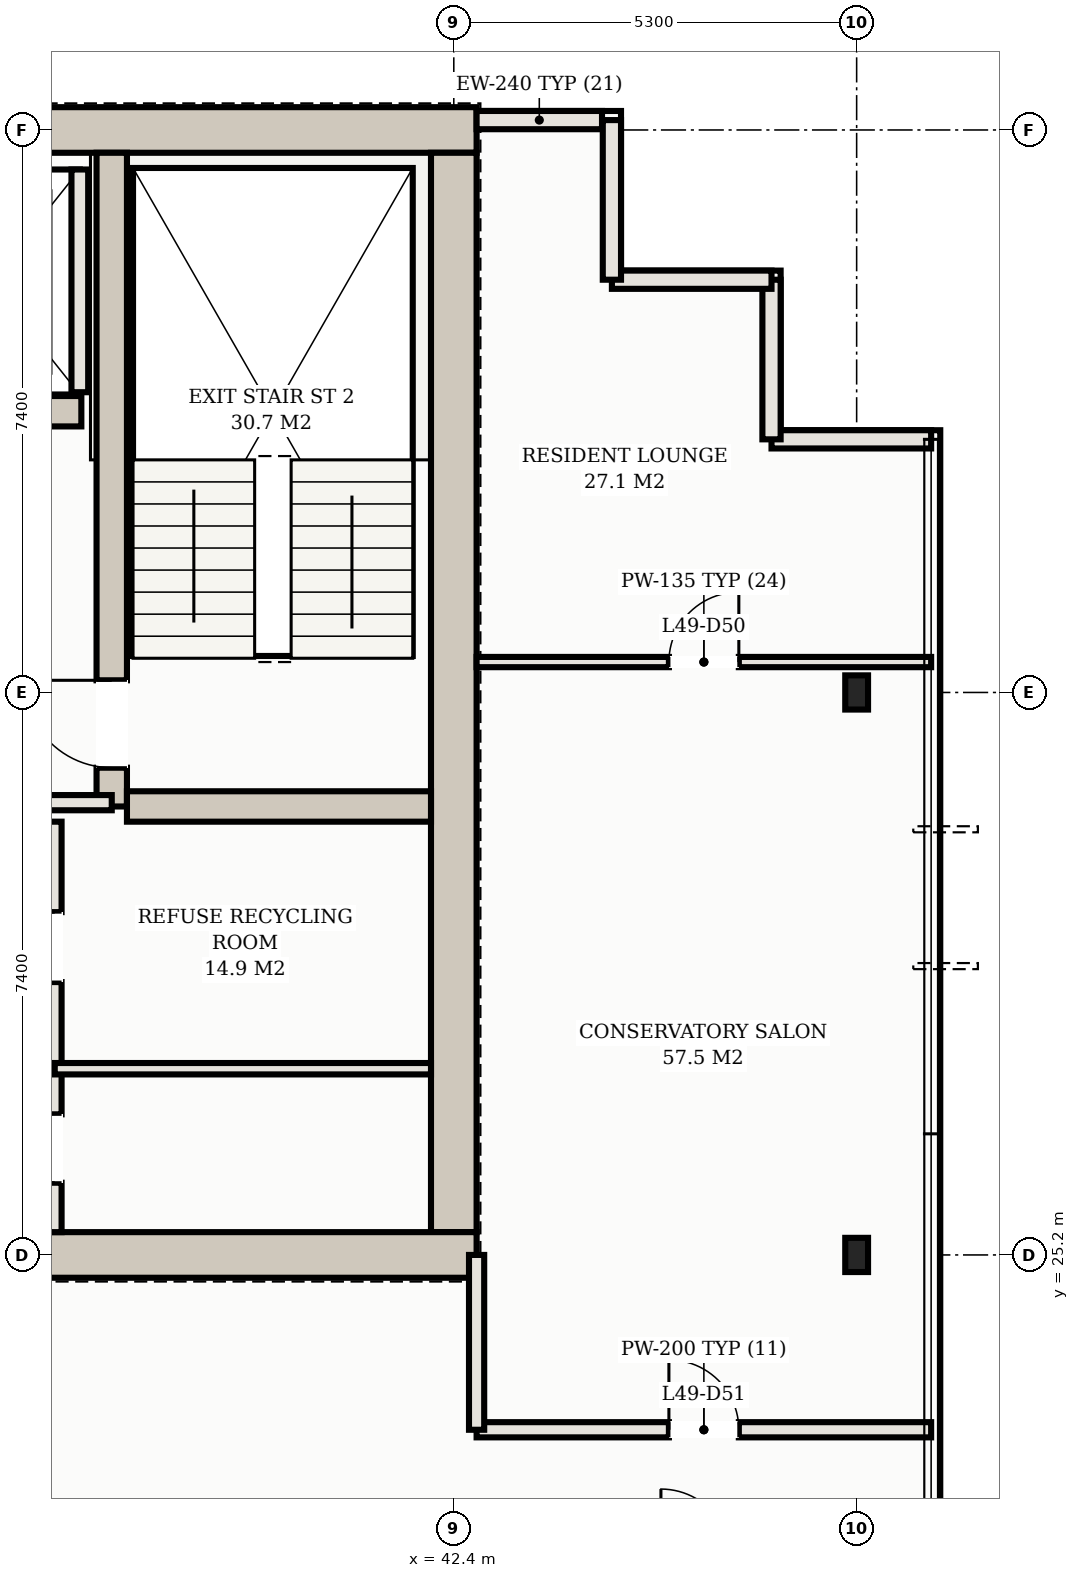
"""IFC4 building model, lengths in metres.
Left out: names, types, materials, properties, quantities, classifications, styles, units other than length and angle.
Written with IfcOpenShell. Run it as: python <this file> out.ifc"""

import sys

from ifc_helpers import new_model, si_unit, direction, frame, frame_2d, origin, origin_2d, place, context, subcontext, project, spatial, rectangle, hollow_rectangle, extrude, element, fill, save


model = new_model("IFC4")
c1 = context("Model", 3, precision=1e-05, world=origin(), true_north=direction((0.0, 1.0)))
c2 = subcontext(c1, "Body", "Model", "MODEL_VIEW")
j1 = project(units=[si_unit("LENGTHUNIT", "METRE"), si_unit("PLANEANGLEUNIT", "RADIAN")], contexts=[c1])
p1 = place(None, origin())
s1 = spatial("IfcSite", under=j1, at=p1, CompositionType="ELEMENT")
p2 = place(p1, origin())
s2 = spatial("IfcBuilding", under=s1, at=p2, CompositionType="ELEMENT")
p3 = place(p2, frame((0.0, 0.0, 178.8)))
s3 = spatial("IfcBuildingStorey", under=s2, at=p3, CompositionType="ELEMENT", Elevation=178.8)
p4 = place(p3, frame((10.3, 40.0, 0.0), z_axis=(0.0, 0.0, 1.0), x_axis=(1.0, 0.0, 0.0)))
e1 = element("IfcWall", 1, at=p4, inside=s3, PredefinedType="SHEAR", context=c2, shape_type="SweptSolid", body=[
    extrude(rectangle(XDim=32.4, YDim=0.6, at=frame_2d((16.2, 0.0))), origin(), (0.0, 0.0, 1.0), 3.1),
])
p5 = place(p3, frame((42.4, 25.5, 0.0), z_axis=(0.0, 0.0, 1.0), x_axis=(0.0, 1.0, 0.0)))
e2 = element("IfcWall", 2, at=p5, inside=s3, PredefinedType="SHEAR", context=c2, shape_type="SweptSolid", body=[
    extrude(rectangle(XDim=14.2, YDim=0.6, at=frame_2d((7.1, 0.0))), origin(), (0.0, 0.0, 1.0), 3.1),
])
p6 = place(p3, frame((34.6, 25.2, 0.0), z_axis=(0.0, 0.0, 1.0), x_axis=(1.0, 0.0, 0.0)))
e3 = element("IfcWall", 3, at=p6, inside=s3, PredefinedType="SHEAR", context=c2, shape_type="SweptSolid", body=[
    extrude(rectangle(XDim=8.1, YDim=0.6, at=frame_2d((4.05, 0.0))), origin(), (0.0, 0.0, 1.0), 3.1),
])
p7 = place(p6, frame((0.65, 0.0, 0.0)))
e4 = element("IfcOpeningElement", 4, at=p7, cuts=e3, PredefinedType="OPENING", context=c2, shape_type="SweptSolid", body=[
    extrude(rectangle(XDim=1.25, YDim=2.2, at=frame_2d((0.625, 1.1))), frame((0.0, 0.31, 0.0), z_axis=(0.0, -1.0, 0.0), x_axis=(1.0, 0.0, 0.0)), (0.0, 0.0, 1.0), 0.62),
])
p8 = place(p3, frame((37.9, 31.1, 0.0), z_axis=(0.0, 0.0, 1.0), x_axis=(0.0, 1.0, 0.0)))
e5 = element("IfcWall", 5, at=p8, inside=s3, PredefinedType="SHEAR", context=c2, shape_type="SweptSolid", body=[
    extrude(rectangle(XDim=8.6, YDim=0.4, at=frame_2d((4.3, 0.0))), origin(), (0.0, 0.0, 1.0), 3.1),
])
p9 = place(p8, frame((0.51, 0.0, 0.0)))
e6 = element("IfcOpeningElement", 6, at=p9, cuts=e5, PredefinedType="OPENING", context=c2, shape_type="SweptSolid", body=[
    extrude(rectangle(XDim=1.15, YDim=2.2, at=frame_2d((0.575, 1.1))), frame((0.0, 0.21, 0.0), z_axis=(0.0, -1.0, 0.0), x_axis=(1.0, 0.0, 0.0)), (0.0, 0.0, 1.0), 0.42),
])
p10 = place(p3, frame((38.1, 31.1, 0.0), z_axis=(0.0, 0.0, 1.0), x_axis=(1.0, 0.0, 0.0)))
e7 = element("IfcWall", 7, at=p10, inside=s3, PredefinedType="SHEAR", context=c2, shape_type="SweptSolid", body=[
    extrude(rectangle(XDim=4.0, YDim=0.4, at=frame_2d((2.0, 0.0))), origin(), (0.0, 0.0, 1.0), 3.1),
])
p11 = place(p3, frame((15.5, 36.3, 0.0), z_axis=(0.0, 0.0, 1.0), x_axis=(1.0, 0.0, 0.0)))
e8 = element("IfcWall", 8, at=p11, inside=s3, PredefinedType="SHEAR", context=c2, shape_type="SweptSolid", body=[
    extrude(rectangle(XDim=22.0, YDim=0.4, at=frame_2d((11.0, 0.0))), origin(), (0.0, 0.0, 1.0), 3.1),
])
p12 = place(p11, frame((0.65, 0.0, 0.0)))
e9 = element("IfcOpeningElement", 9, at=p12, cuts=e8, PredefinedType="OPENING", context=c2, shape_type="SweptSolid", body=[
    extrude(rectangle(XDim=1.1, YDim=2.15, at=frame_2d((0.55, 1.075))), frame((0.0, 0.21, 0.0), z_axis=(0.0, -1.0, 0.0), x_axis=(1.0, 0.0, 0.0)), (0.0, 0.0, 1.0), 0.42),
])
p13 = place(p11, frame((20.25, 0.0, 0.0)))
e10 = element("IfcOpeningElement", 10, at=p13, cuts=e8, PredefinedType="OPENING", context=c2, shape_type="SweptSolid", body=[
    extrude(rectangle(XDim=1.1, YDim=2.15, at=frame_2d((0.55, 1.075))), frame((0.0, 0.21, 0.0), z_axis=(0.0, -1.0, 0.0), x_axis=(1.0, 0.0, 0.0)), (0.0, 0.0, 1.0), 0.42),
])
p14 = place(p11, frame((17.05, 0.0, 0.0)))
e11 = element("IfcOpeningElement", 11, at=p14, cuts=e8, PredefinedType="OPENING", context=c2, shape_type="SweptSolid", body=[
    extrude(rectangle(XDim=1.3, YDim=2.2, at=frame_2d((0.65, 1.1))), frame((0.0, 0.21, 0.0), z_axis=(0.0, -1.0, 0.0), x_axis=(1.0, 0.0, 0.0)), (0.0, 0.0, 1.0), 0.42),
])
for number, where, z_axis, x_axis in (
    (12, (47.7, 25.2, 0.0), (0.0, 0.0, 1.0), (1.0, 0.0, 0.0)),
    (13, (47.7, 32.6, 0.0), (0.0, 0.0, 1.0), (1.0, 0.0, 0.0)),
):
    element("IfcColumn", number, at=place(p3, frame(where, z_axis=z_axis, x_axis=x_axis)), inside=s3, PredefinedType="COLUMN", context=c2, shape_type="SweptSolid", body=[
        extrude(hollow_rectangle(XDim=0.3, YDim=0.45, WallThickness=0.016, at=origin_2d()), origin(), (0.0, 0.0, 1.0), 3.3),
    ])
p15 = place(p3, frame((37.48, 36.55, 0.0), z_axis=(0.0, 0.0, 1.0), x_axis=(0.0, 1.0, 0.0)))
e14 = element("IfcWall", 14, at=p15, inside=s3, PredefinedType="SOLIDWALL", context=c2, shape_type="SweptSolid", body=[
    extrude(rectangle(XDim=2.93, YDim=0.22, at=frame_2d((1.465, 0.0))), origin(), (0.0, 0.0, 1.0), 3.1),
])
p16 = place(p3, frame((48.68, 35.93, 0.0), z_axis=(0.0, 0.0, 1.0), x_axis=(-1.0, 0.0, 0.0)))
e15 = element("IfcWall", 15, at=p16, inside=s3, PredefinedType="SOLIDWALL", context=c2, shape_type="SweptSolid", body=[
    extrude(rectangle(XDim=2.1, YDim=0.24, at=frame_2d((1.05, 0.0))), origin(), (0.0, 0.0, 1.0), 3.1),
])
for number, where, z_axis, x_axis in (
    (16, (46.58, 35.93, 0.0), (0.0, 0.0, 1.0), (0.0, 1.0, 0.0)),
    (17, (46.58, 38.03, 0.0), (0.0, 0.0, 1.0), (-1.0, 0.0, 0.0)),
):
    element("IfcWall", number, at=place(p3, frame(where, z_axis=z_axis, x_axis=x_axis)), inside=s3, PredefinedType="SOLIDWALL", context=c2, shape_type="SweptSolid", body=[
        extrude(rectangle(XDim=2.1, YDim=0.24, at=frame_2d((1.05, 0.0))), origin(), (0.0, 0.0, 1.0), 3.1),
    ])
p17 = place(p3, frame((44.48, 38.03, 0.0), z_axis=(0.0, 0.0, 1.0), x_axis=(0.0, 1.0, 0.0)))
e18 = element("IfcWall", 18, at=p17, inside=s3, PredefinedType="SOLIDWALL", context=c2, shape_type="SweptSolid", body=[
    extrude(rectangle(XDim=2.1, YDim=0.24, at=frame_2d((1.05, 0.0))), origin(), (0.0, 0.0, 1.0), 3.1),
])
p18 = place(p3, frame((44.35, 40.13, 0.0), z_axis=(0.0, 0.0, 1.0), x_axis=(-1.0, 0.0, 0.0)))
e19 = element("IfcWall", 19, at=p18, inside=s3, PredefinedType="SOLIDWALL", context=c2, shape_type="SweptSolid", body=[
    extrude(rectangle(XDim=1.65, YDim=0.24, at=frame_2d((0.825, 0.0))), origin(), (0.0, 0.0, 1.0), 3.1),
])
p19 = place(p3, frame((34.65, 31.15, 0.0), z_axis=(0.0, 0.0, 1.0), x_axis=(1.0, 0.0, 0.0)))
e20 = element("IfcWall", 20, at=p19, inside=s3, PredefinedType="PARTITIONING", context=c2, shape_type="SweptSolid", body=[
    extrude(rectangle(XDim=3.25, YDim=0.2, at=frame_2d((1.625, 0.0))), origin(), (0.0, 0.0, 1.0), 2.38),
])
p20 = place(p19, frame((0.725, 0.0, 0.0)))
e21 = element("IfcOpeningElement", 21, at=p20, cuts=e20, PredefinedType="OPENING", context=c2, shape_type="SweptSolid", body=[
    extrude(rectangle(XDim=1.25, YDim=2.2, at=frame_2d((0.625, 1.1))), frame((0.0, 0.11, 0.0), z_axis=(0.0, -1.0, 0.0), x_axis=(1.0, 0.0, 0.0)), (0.0, 0.0, 1.0), 0.22),
])
p21 = place(p3, frame((37.15, 25.5, 0.0), z_axis=(0.0, 0.0, 1.0), x_axis=(0.0, 1.0, 0.0)))
e22 = element("IfcWall", 22, at=p21, inside=s3, PredefinedType="PARTITIONING", context=c2, shape_type="SweptSolid", body=[
    extrude(rectangle(XDim=5.4, YDim=0.18, at=frame_2d((2.7, 0.0))), origin(), (0.0, 0.0, 1.0), 2.38),
])
p22 = place(p21, frame((0.65, 0.0, 0.0)))
e23 = element("IfcOpeningElement", 23, at=p22, cuts=e22, PredefinedType="OPENING", context=c2, shape_type="SweptSolid", body=[
    extrude(rectangle(XDim=0.9, YDim=2.15, at=frame_2d((0.45, 1.075))), frame((0.0, 0.1, 0.0), z_axis=(0.0, -1.0, 0.0), x_axis=(1.0, 0.0, 0.0)), (0.0, 0.0, 1.0), 0.2),
])
p23 = place(p21, frame((3.29, 0.0, 0.0)))
e24 = element("IfcOpeningElement", 24, at=p23, cuts=e22, PredefinedType="OPENING", context=c2, shape_type="SweptSolid", body=[
    extrude(rectangle(XDim=0.92, YDim=2.15, at=frame_2d((0.46, 1.075))), frame((0.0, 0.1, 0.0), z_axis=(0.0, -1.0, 0.0), x_axis=(1.0, 0.0, 0.0)), (0.0, 0.0, 1.0), 0.2),
])
p24 = place(p3, frame((37.15, 27.65, 0.0), z_axis=(0.0, 0.0, 1.0), x_axis=(1.0, 0.0, 0.0)))
e25 = element("IfcWall", 25, at=p24, inside=s3, PredefinedType="PARTITIONING", context=c2, shape_type="SweptSolid", body=[
    extrude(rectangle(XDim=4.95, YDim=0.15, at=frame_2d((2.475, 0.0))), origin(), (0.0, 0.0, 1.0), 2.38),
])
p25 = place(p3, frame((42.7, 22.9, 0.0), z_axis=(0.0, 0.0, 1.0), x_axis=(1.0, 0.0, 0.0)))
e26 = element("IfcWall", 26, at=p25, inside=s3, PredefinedType="PARTITIONING", context=c2, shape_type="SweptSolid", body=[
    extrude(rectangle(XDim=5.98, YDim=0.2, at=frame_2d((2.99, 0.0))), origin(), (0.0, 0.0, 1.0), 2.38),
])
p26 = place(p25, frame((2.53, 0.0, 0.0)))
e27 = element("IfcOpeningElement", 27, at=p26, cuts=e26, PredefinedType="OPENING", context=c2, shape_type="SweptSolid", body=[
    extrude(rectangle(XDim=0.92, YDim=2.15, at=frame_2d((0.46, 1.075))), frame((0.0, 0.11, 0.0), z_axis=(0.0, -1.0, 0.0), x_axis=(1.0, 0.0, 0.0)), (0.0, 0.0, 1.0), 0.22),
])
p27 = place(p3, frame((42.7, 22.9, 0.0), z_axis=(0.0, 0.0, 1.0), x_axis=(0.0, 1.0, 0.0)))
e28 = element("IfcWall", 28, at=p27, inside=s3, PredefinedType="PARTITIONING", context=c2, shape_type="SweptSolid", body=[
    extrude(rectangle(XDim=2.3, YDim=0.2, at=frame_2d((1.15, 0.0))), origin(), (0.0, 0.0, 1.0), 2.38),
])
p28 = place(p3, frame((42.7, 33.0, 0.0), z_axis=(0.0, 0.0, 1.0), x_axis=(1.0, 0.0, 0.0)))
e29 = element("IfcWall", 29, at=p28, inside=s3, PredefinedType="PARTITIONING", context=c2, shape_type="SweptSolid", body=[
    extrude(rectangle(XDim=5.98, YDim=0.135, at=frame_2d((2.99, 0.0))), origin(), (0.0, 0.0, 1.0), 2.38),
])
p29 = place(p28, frame((2.53, 0.0, 0.0)))
e30 = element("IfcOpeningElement", 30, at=p29, cuts=e29, PredefinedType="OPENING", context=c2, shape_type="SweptSolid", body=[
    extrude(rectangle(XDim=0.92, YDim=2.15, at=frame_2d((0.46, 1.075))), frame((0.0, 0.078, 0.0), z_axis=(0.0, -1.0, 0.0), x_axis=(1.0, 0.0, 0.0)), (0.0, 0.0, 1.0), 0.155),
])
p30 = place(p9, origin())
e31 = element("IfcDoor", 31, at=p30, inside=s3, OperationType="SINGLE_SWING_RIGHT", PredefinedType="DOOR", context=c2, shape_type="SweptSolid", body=[
    extrude(rectangle(XDim=1.15, YDim=2.2, at=frame_2d((0.575, 1.1))), frame((0.0, 0.025, 0.0), z_axis=(0.0, -1.0, 0.0), x_axis=(1.0, 0.0, 0.0)), (0.0, 0.0, 1.0), 0.05),
])
fill(e6, e31)
p31 = place(p22, origin())
e32 = element("IfcDoor", 32, at=p31, inside=s3, OperationType="SINGLE_SWING_LEFT", PredefinedType="DOOR", context=c2, shape_type="SweptSolid", body=[
    extrude(rectangle(XDim=0.9, YDim=2.15, at=frame_2d((0.45, 1.075))), frame((0.0, 0.025, 0.0), z_axis=(0.0, -1.0, 0.0), x_axis=(1.0, 0.0, 0.0)), (0.0, 0.0, 1.0), 0.05),
])
fill(e23, e32)
p32 = place(p23, origin())
e33 = element("IfcDoor", 33, at=p32, inside=s3, OperationType="SINGLE_SWING_RIGHT", PredefinedType="DOOR", context=c2, shape_type="SweptSolid", body=[
    extrude(rectangle(XDim=0.92, YDim=2.15, at=frame_2d((0.46, 1.075))), frame((0.0, 0.025, 0.0), z_axis=(0.0, -1.0, 0.0), x_axis=(1.0, 0.0, 0.0)), (0.0, 0.0, 1.0), 0.05),
])
fill(e24, e33)
p33 = place(p29, origin())
e34 = element("IfcDoor", 34, at=p33, inside=s3, OperationType="SINGLE_SWING_RIGHT", PredefinedType="DOOR", context=c2, shape_type="SweptSolid", body=[
    extrude(rectangle(XDim=0.92, YDim=2.15, at=frame_2d((0.46, 1.075))), frame((0.0, 0.025, 0.0), z_axis=(0.0, -1.0, 0.0), x_axis=(1.0, 0.0, 0.0)), (0.0, 0.0, 1.0), 0.05),
])
fill(e30, e34)
p34 = place(p26, origin())
e35 = element("IfcDoor", 35, at=p34, inside=s3, OperationType="SINGLE_SWING_LEFT", PredefinedType="DOOR", context=c2, shape_type="SweptSolid", body=[
    extrude(rectangle(XDim=0.92, YDim=2.15, at=frame_2d((0.46, 1.075))), frame((0.0, 0.025, 0.0), z_axis=(0.0, -1.0, 0.0), x_axis=(1.0, 0.0, 0.0)), (0.0, 0.0, 1.0), 0.05),
])
fill(e27, e35)
save(model, sys.argv[1])
